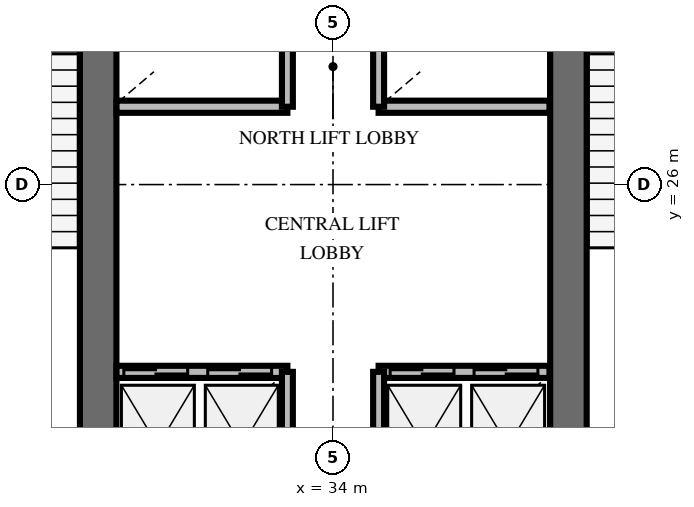
"""IFC4 building model, lengths in metres.
Left out: names, types, materials, properties, quantities, classifications, styles, units other than length and angle.
Written with IfcOpenShell. Run it as: python <this file> out.ifc"""

import sys

from ifc_helpers import new_model, si_unit, direction, frame, frame_2d, origin, place, context, subcontext, project, spatial, rectangle, extrude, element, fill, save


model = new_model("IFC4")
c1 = context("Model", 3, precision=1e-05, world=origin(), true_north=direction((0.0, 1.0)))
c2 = subcontext(c1, "Body", "Model", "MODEL_VIEW")
j1 = project(units=[si_unit("LENGTHUNIT", "METRE"), si_unit("PLANEANGLEUNIT", "RADIAN")], contexts=[c1])
p1 = place(None, origin())
s1 = spatial("IfcSite", under=j1, at=p1, CompositionType="ELEMENT")
p2 = place(p1, origin())
s2 = spatial("IfcBuilding", under=s1, at=p2, CompositionType="ELEMENT")
p3 = place(p2, frame((0.0, 0.0, 113.8)))
s3 = spatial("IfcBuildingStorey", under=s2, at=p3, CompositionType="ELEMENT", Elevation=113.8)
for number, where, z_axis, x_axis in (
    (1, (30.138, 20.187, 0.0), (0.0, 0.0, 1.0), (0.0, 1.0, 0.0)),
    (2, (37.872, 20.187, 0.0), (0.0, 0.0, 1.0), (0.0, 1.0, 0.0)),
):
    element("IfcWall", number, at=place(p3, frame(where, z_axis=z_axis, x_axis=x_axis)), inside=s3, PredefinedType="SHEAR", context=c2, shape_type="SweptSolid", body=[
        extrude(rectangle(XDim=9.826, YDim=0.6, at=frame_2d((4.913, 0.0))), origin(), (0.0, 0.0, 1.0), 4.0),
    ])
p4 = place(p3, frame((30.44, 22.92, 0.0), z_axis=(0.0, 0.0, 1.0), x_axis=(1.0, 0.0, 0.0)))
e3 = element("IfcWall", 3, at=p4, inside=s3, PredefinedType="SOLIDWALL", context=c2, shape_type="SweptSolid", body=[
    extrude(rectangle(XDim=2.81, YDim=0.2, at=frame_2d((1.405, 0.0))), origin(), (0.0, 0.0, 1.0), 2.8),
])
p5 = place(p4, frame((0.12, 0.0, 0.0)))
e4 = element("IfcOpeningElement", 4, at=p5, cuts=e3, PredefinedType="OPENING", context=c2, shape_type="SweptSolid", body=[
    extrude(rectangle(XDim=1.05, YDim=2.1, at=frame_2d((0.525, 1.05))), frame((0.0, 0.11, 0.0), z_axis=(0.0, -1.0, 0.0), x_axis=(1.0, 0.0, 0.0)), (0.0, 0.0, 1.0), 0.22),
])
p6 = place(p4, frame((1.5, 0.0, 0.0)))
e5 = element("IfcOpeningElement", 5, at=p6, cuts=e3, PredefinedType="OPENING", context=c2, shape_type="SweptSolid", body=[
    extrude(rectangle(XDim=1.05, YDim=2.1, at=frame_2d((0.525, 1.05))), frame((0.0, 0.11, 0.0), z_axis=(0.0, -1.0, 0.0), x_axis=(1.0, 0.0, 0.0)), (0.0, 0.0, 1.0), 0.22),
])
p7 = place(p3, frame((33.25, 20.5, 0.0), z_axis=(0.0, 0.0, 1.0), x_axis=(0.0, 1.0, 0.0)))
e6 = element("IfcWall", 6, at=p7, inside=s3, PredefinedType="SOLIDWALL", context=c2, shape_type="SweptSolid", body=[
    extrude(rectangle(XDim=2.42, YDim=0.18, at=frame_2d((1.21, 0.0))), origin(), (0.0, 0.0, 1.0), 2.8),
])
p8 = place(p3, frame((34.75, 22.92, 0.0), z_axis=(0.0, 0.0, 1.0), x_axis=(1.0, 0.0, 0.0)))
e7 = element("IfcWall", 7, at=p8, inside=s3, PredefinedType="SOLIDWALL", context=c2, shape_type="SweptSolid", body=[
    extrude(rectangle(XDim=2.81, YDim=0.2, at=frame_2d((1.405, 0.0))), origin(), (0.0, 0.0, 1.0), 2.8),
])
p9 = place(p8, frame((0.19, 0.0, 0.0)))
e8 = element("IfcOpeningElement", 8, at=p9, cuts=e7, PredefinedType="OPENING", context=c2, shape_type="SweptSolid", body=[
    extrude(rectangle(XDim=1.05, YDim=2.1, at=frame_2d((0.525, 1.05))), frame((0.0, 0.11, 0.0), z_axis=(0.0, -1.0, 0.0), x_axis=(1.0, 0.0, 0.0)), (0.0, 0.0, 1.0), 0.22),
])
p10 = place(p8, frame((1.57, 0.0, 0.0)))
e9 = element("IfcOpeningElement", 9, at=p10, cuts=e7, PredefinedType="OPENING", context=c2, shape_type="SweptSolid", body=[
    extrude(rectangle(XDim=1.05, YDim=2.1, at=frame_2d((0.525, 1.05))), frame((0.0, 0.11, 0.0), z_axis=(0.0, -1.0, 0.0), x_axis=(1.0, 0.0, 0.0)), (0.0, 0.0, 1.0), 0.22),
])
p11 = place(p3, frame((34.75, 20.5, 0.0), z_axis=(0.0, 0.0, 1.0), x_axis=(0.0, 1.0, 0.0)))
e10 = element("IfcWall", 10, at=p11, inside=s3, PredefinedType="SOLIDWALL", context=c2, shape_type="SweptSolid", body=[
    extrude(rectangle(XDim=2.42, YDim=0.18, at=frame_2d((1.21, 0.0))), origin(), (0.0, 0.0, 1.0), 2.8),
])
p12 = place(p3, frame((30.44, 27.28, 0.0), z_axis=(0.0, 0.0, 1.0), x_axis=(1.0, 0.0, 0.0)))
e11 = element("IfcWall", 11, at=p12, inside=s3, PredefinedType="SOLIDWALL", context=c2, shape_type="SweptSolid", body=[
    extrude(rectangle(XDim=2.81, YDim=0.2, at=frame_2d((1.405, 0.0))), origin(), (0.0, 0.0, 1.0), 2.8),
])
p13 = place(p3, frame((33.25, 27.28, 0.0), z_axis=(0.0, 0.0, 1.0), x_axis=(0.0, 1.0, 0.0)))
e12 = element("IfcWall", 12, at=p13, inside=s3, PredefinedType="SOLIDWALL", context=c2, shape_type="SweptSolid", body=[
    extrude(rectangle(XDim=2.47, YDim=0.18, at=frame_2d((1.235, 0.0))), origin(), (0.0, 0.0, 1.0), 2.8),
])
p14 = place(p3, frame((34.75, 27.28, 0.0), z_axis=(0.0, 0.0, 1.0), x_axis=(1.0, 0.0, 0.0)))
e13 = element("IfcWall", 13, at=p14, inside=s3, PredefinedType="SOLIDWALL", context=c2, shape_type="SweptSolid", body=[
    extrude(rectangle(XDim=2.81, YDim=0.2, at=frame_2d((1.405, 0.0))), origin(), (0.0, 0.0, 1.0), 2.8),
])
p15 = place(p3, frame((34.75, 27.28, 0.0), z_axis=(0.0, 0.0, 1.0), x_axis=(0.0, 1.0, 0.0)))
e14 = element("IfcWall", 14, at=p15, inside=s3, PredefinedType="SOLIDWALL", context=c2, shape_type="SweptSolid", body=[
    extrude(rectangle(XDim=2.47, YDim=0.18, at=frame_2d((1.235, 0.0))), origin(), (0.0, 0.0, 1.0), 2.8),
])
p16 = place(p5, origin())
e15 = element("IfcDoor", 15, at=p16, inside=s3, OperationType="DOUBLE_DOOR_SLIDING", PredefinedType="USERDEFINED", context=c2, shape_type="SweptSolid", body=[
    extrude(rectangle(XDim=1.05, YDim=2.1, at=frame_2d((0.525, 1.05))), frame((0.0, 0.025, 0.0), z_axis=(0.0, -1.0, 0.0), x_axis=(1.0, 0.0, 0.0)), (0.0, 0.0, 1.0), 0.05),
])
fill(e4, e15)
p17 = place(p6, origin())
e16 = element("IfcDoor", 16, at=p17, inside=s3, OperationType="DOUBLE_DOOR_SLIDING", PredefinedType="USERDEFINED", context=c2, shape_type="SweptSolid", body=[
    extrude(rectangle(XDim=1.05, YDim=2.1, at=frame_2d((0.525, 1.05))), frame((0.0, 0.025, 0.0), z_axis=(0.0, -1.0, 0.0), x_axis=(1.0, 0.0, 0.0)), (0.0, 0.0, 1.0), 0.05),
])
fill(e5, e16)
p18 = place(p9, origin())
e17 = element("IfcDoor", 17, at=p18, inside=s3, OperationType="DOUBLE_DOOR_SLIDING", PredefinedType="USERDEFINED", context=c2, shape_type="SweptSolid", body=[
    extrude(rectangle(XDim=1.05, YDim=2.1, at=frame_2d((0.525, 1.05))), frame((0.0, 0.025, 0.0), z_axis=(0.0, -1.0, 0.0), x_axis=(1.0, 0.0, 0.0)), (0.0, 0.0, 1.0), 0.05),
])
fill(e8, e17)
p19 = place(p10, origin())
e18 = element("IfcDoor", 18, at=p19, inside=s3, OperationType="DOUBLE_DOOR_SLIDING", PredefinedType="USERDEFINED", context=c2, shape_type="SweptSolid", body=[
    extrude(rectangle(XDim=1.05, YDim=2.1, at=frame_2d((0.525, 1.05))), frame((0.0, 0.025, 0.0), z_axis=(0.0, -1.0, 0.0), x_axis=(1.0, 0.0, 0.0)), (0.0, 0.0, 1.0), 0.05),
])
fill(e9, e18)
save(model, sys.argv[1])
